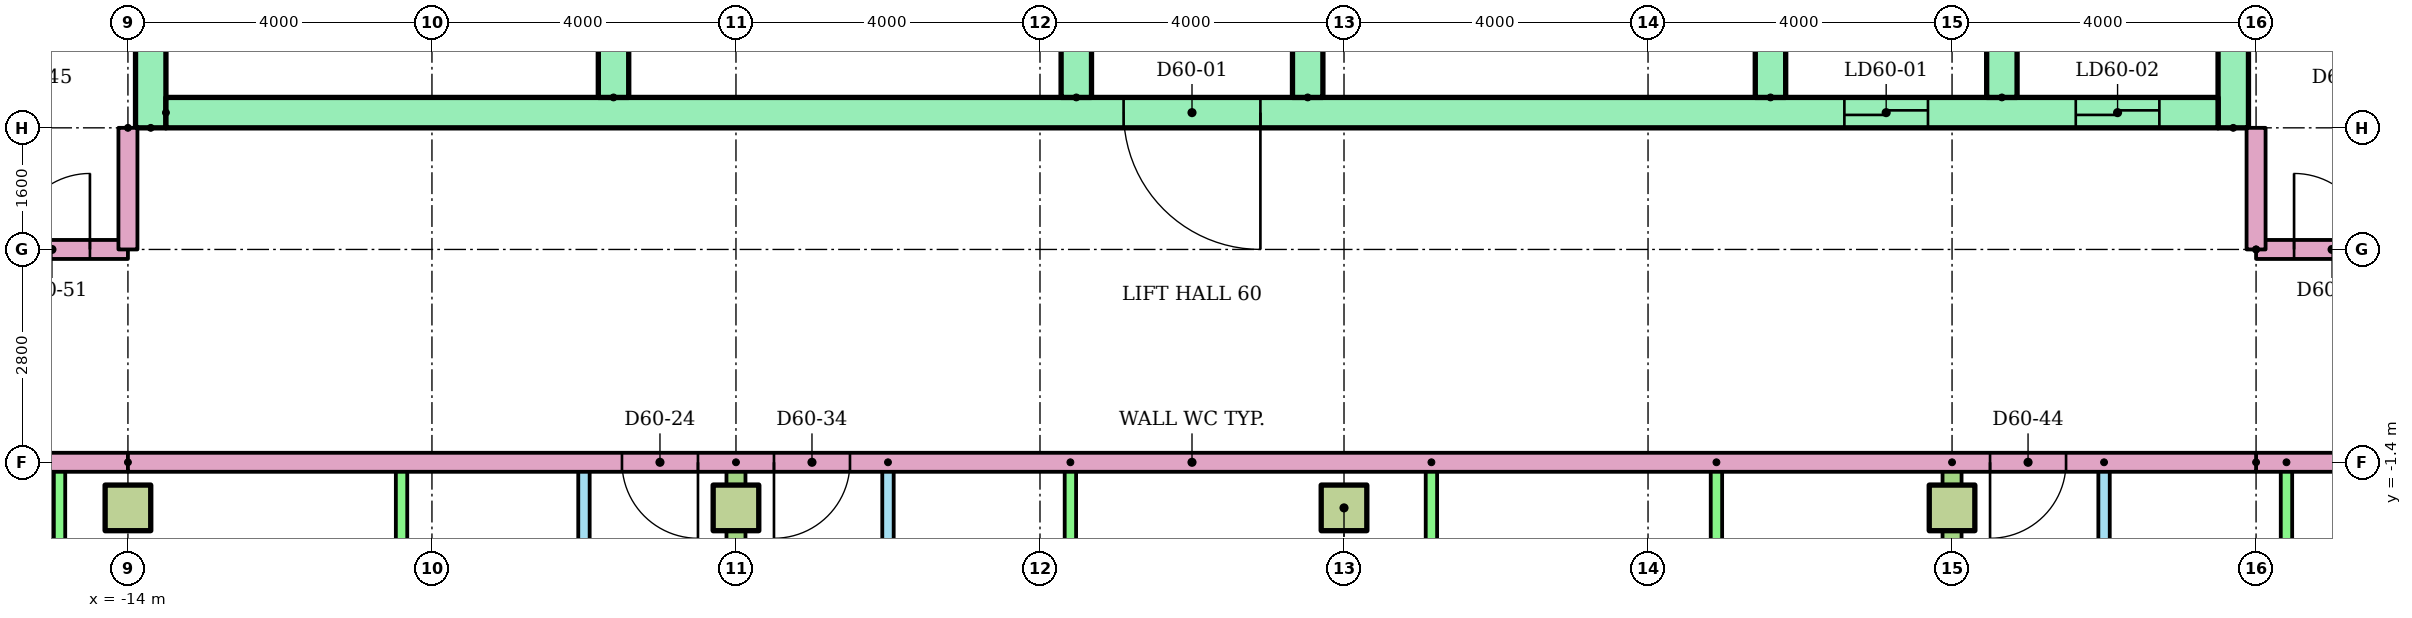
"""IFC4 building model, lengths in metres.
Left out: names, types, materials, properties, quantities, classifications, styles, units other than length and angle.
Written with IfcOpenShell. Run it as: python <this file> out.ifc"""

import sys

from ifc_helpers import new_model, si_unit, direction, frame, frame_2d, origin, origin_2d, place, context, subcontext, project, spatial, rectangle, extrude, element, fill, save


model = new_model("IFC4")
c1 = context("Model", 3, precision=1e-05, world=origin(), true_north=direction((0.0, 1.0)))
c2 = subcontext(c1, "Body", "Model", "MODEL_VIEW")
j1 = project(units=[si_unit("LENGTHUNIT", "METRE"), si_unit("PLANEANGLEUNIT", "RADIAN")], contexts=[c1])
p1 = place(None, origin())
s1 = spatial("IfcSite", under=j1, at=p1, CompositionType="ELEMENT")
p2 = place(p1, origin())
s2 = spatial("IfcBuilding", under=s1, at=p2, CompositionType="ELEMENT")
p3 = place(p2, frame((0.0, 0.0, 230.0)))
s3 = spatial("IfcBuildingStorey", under=s2, at=p3, CompositionType="ELEMENT", Elevation=230.0)
for number, where in (
    (1, (-14.0, -2.0, 0.0)),
    (2, (-6.0, -2.0, 0.0)),
    (3, (2.0, -2.0, 0.0)),
    (4, (10.0, -2.0, 0.0)),
):
    element("IfcColumn", number, at=place(p3, frame(where)), inside=s3, PredefinedType="COLUMN", context=c2, shape_type="SweptSolid", body=[
        extrude(rectangle(XDim=0.6, YDim=0.6, at=origin_2d()), origin(), (0.0, 0.0, 1.0), 3.2),
    ])
for number, where, z_axis, x_axis in (
    (5, (-13.7, 3.0, 0.0), (0.0, 0.0, 1.0), (0.0, 1.0, 0.0)),
    (6, (13.7, 3.0, 0.0), (0.0, 0.0, 1.0), (0.0, 1.0, 0.0)),
):
    element("IfcWall", number, at=place(p3, frame(where, z_axis=z_axis, x_axis=x_axis)), inside=s3, PredefinedType="SHEAR", context=c2, shape_type="SweptSolid", body=[
        extrude(rectangle(XDim=17.0, YDim=0.4, at=frame_2d((8.5, 0.0))), origin(), (0.0, 0.0, 1.0), 2.92),
    ])
p4 = place(p3, frame((-13.5, 3.2, 0.0)))
e7 = element("IfcWall", 7, at=p4, inside=s3, PredefinedType="SHEAR", context=c2, shape_type="SweptSolid", body=[
    extrude(rectangle(XDim=27.0, YDim=0.4, at=frame_2d((13.5, 0.0))), origin(), (0.0, 0.0, 1.0), 2.92),
])
p5 = place(p4, frame((22.083, 0.0, 0.0)))
e8 = element("IfcOpeningElement", 8, at=p5, cuts=e7, PredefinedType="OPENING", context=c2, shape_type="SweptSolid", body=[
    extrude(rectangle(XDim=1.1, YDim=2.1, at=frame_2d((0.55, 1.05))), frame((0.0, 0.21, 0.0), z_axis=(0.0, -1.0, 0.0), x_axis=(1.0, 0.0, 0.0)), (0.0, 0.0, 1.0), 0.42),
])
p6 = place(p4, frame((25.128, 0.0, 0.0)))
e9 = element("IfcOpeningElement", 9, at=p6, cuts=e7, PredefinedType="OPENING", context=c2, shape_type="SweptSolid", body=[
    extrude(rectangle(XDim=1.1, YDim=2.1, at=frame_2d((0.55, 1.05))), frame((0.0, 0.21, 0.0), z_axis=(0.0, -1.0, 0.0), x_axis=(1.0, 0.0, 0.0)), (0.0, 0.0, 1.0), 0.42),
])
p7 = place(p4, frame((12.6, 0.0, 0.0)))
e10 = element("IfcOpeningElement", 10, at=p7, cuts=e7, PredefinedType="OPENING", context=c2, shape_type="SweptSolid", body=[
    extrude(rectangle(XDim=1.8, YDim=2.1, at=frame_2d((0.9, 1.05))), frame((0.0, 0.21, 0.0), z_axis=(0.0, -1.0, 0.0), x_axis=(1.0, 0.0, 0.0)), (0.0, 0.0, 1.0), 0.42),
])
for number, where, z_axis, x_axis in (
    (11, (-7.611, 3.4, 0.0), (0.0, 0.0, 1.0), (0.0, 1.0, 0.0)),
    (12, (-1.522, 3.4, 0.0), (0.0, 0.0, 1.0), (0.0, 1.0, 0.0)),
    (13, (1.522, 3.4, 0.0), (0.0, 0.0, 1.0), (0.0, 1.0, 0.0)),
    (14, (7.611, 3.4, 0.0), (0.0, 0.0, 1.0), (0.0, 1.0, 0.0)),
    (15, (10.656, 3.4, 0.0), (0.0, 0.0, 1.0), (0.0, 1.0, 0.0)),
):
    element("IfcWall", number, at=place(p3, frame(where, z_axis=z_axis, x_axis=x_axis)), inside=s3, PredefinedType="SHEAR", context=c2, shape_type="SweptSolid", body=[
        extrude(rectangle(XDim=3.0, YDim=0.4, at=frame_2d((1.5, 0.0))), origin(), (0.0, 0.0, 1.0), 2.92),
    ])
p8 = place(p3, frame((-8.0, -7.0, 0.0), z_axis=(0.0, 0.0, 1.0), x_axis=(0.0, 1.0, 0.0)))
e16 = element("IfcWall", 16, at=p8, inside=s3, PredefinedType="PARTITIONING", context=c2, shape_type="SweptSolid", body=[
    extrude(rectangle(XDim=5.6, YDim=0.15, at=frame_2d((2.8, 0.0))), origin(), (0.0, 0.0, 1.0), 2.4),
])
p9 = place(p8, frame((3.65, 0.0, 0.0)))
e17 = element("IfcOpeningElement", 17, at=p9, cuts=e16, PredefinedType="OPENING", context=c2, shape_type="SweptSolid", body=[
    extrude(rectangle(XDim=0.9, YDim=2.1, at=frame_2d((0.45, 1.05))), frame((0.0, 0.085, 0.0), z_axis=(0.0, -1.0, 0.0), x_axis=(1.0, 0.0, 0.0)), (0.0, 0.0, 1.0), 0.17),
])
p10 = place(p8, frame((0.9, 0.0, 0.0)))
e18 = element("IfcOpeningElement", 18, at=p10, cuts=e16, PredefinedType="OPENING", context=c2, shape_type="SweptSolid", body=[
    extrude(rectangle(XDim=0.8, YDim=2.1, at=frame_2d((0.4, 1.05))), frame((0.0, 0.085, 0.0), z_axis=(0.0, -1.0, 0.0), x_axis=(1.0, 0.0, 0.0)), (0.0, 0.0, 1.0), 0.17),
])
for number, where, z_axis, x_axis in (
    (19, (-10.4, -7.0, 0.0), (0.0, 0.0, 1.0), (0.0, 1.0, 0.0)),
    (20, (-14.9, -7.0, 0.0), (0.0, 0.0, 1.0), (0.0, 1.0, 0.0)),
):
    element("IfcWall", number, at=place(p3, frame(where, z_axis=z_axis, x_axis=x_axis)), inside=s3, PredefinedType="PARTITIONING", context=c2, shape_type="SweptSolid", body=[
        extrude(rectangle(XDim=5.6, YDim=0.15, at=frame_2d((2.8, 0.0))), origin(), (0.0, 0.0, 1.0), 2.4),
    ])
p11 = place(p3, frame((-4.0, -1.4, 0.0), z_axis=(0.0, 0.0, 1.0), x_axis=(0.0, -1.0, 0.0)))
e21 = element("IfcWall", 21, at=p11, inside=s3, PredefinedType="PARTITIONING", context=c2, shape_type="SweptSolid", body=[
    extrude(rectangle(XDim=5.6, YDim=0.15, at=frame_2d((2.8, 0.0))), origin(), (0.0, 0.0, 1.0), 2.4),
])
p12 = place(p11, frame((1.05, 0.0, 0.0)))
e22 = element("IfcOpeningElement", 22, at=p12, cuts=e21, PredefinedType="OPENING", context=c2, shape_type="SweptSolid", body=[
    extrude(rectangle(XDim=0.9, YDim=2.1, at=frame_2d((0.45, 1.05))), frame((0.0, 0.085, 0.0), z_axis=(0.0, -1.0, 0.0), x_axis=(1.0, 0.0, 0.0)), (0.0, 0.0, 1.0), 0.17),
])
p13 = place(p11, frame((3.9, 0.0, 0.0)))
e23 = element("IfcOpeningElement", 23, at=p13, cuts=e21, PredefinedType="OPENING", context=c2, shape_type="SweptSolid", body=[
    extrude(rectangle(XDim=0.8, YDim=2.1, at=frame_2d((0.4, 1.05))), frame((0.0, 0.085, 0.0), z_axis=(0.0, -1.0, 0.0), x_axis=(1.0, 0.0, 0.0)), (0.0, 0.0, 1.0), 0.17),
])
for number, where, z_axis, x_axis in (
    (24, (-1.6, -1.4, 0.0), (0.0, 0.0, 1.0), (0.0, -1.0, 0.0)),
    (25, (3.15, -1.4, 0.0), (0.0, 0.0, 1.0), (0.0, -1.0, 0.0)),
    (26, (6.9, -1.4, 0.0), (0.0, 0.0, 1.0), (0.0, -1.0, 0.0)),
):
    element("IfcWall", number, at=place(p3, frame(where, z_axis=z_axis, x_axis=x_axis)), inside=s3, PredefinedType="PARTITIONING", context=c2, shape_type="SweptSolid", body=[
        extrude(rectangle(XDim=5.6, YDim=0.15, at=frame_2d((2.8, 0.0))), origin(), (0.0, 0.0, 1.0), 2.4),
    ])
p14 = place(p3, frame((-6.0, -1.4, 0.0), z_axis=(0.0, 0.0, 1.0), x_axis=(0.0, -1.0, 0.0)))
e27 = element("IfcWall", 27, at=p14, inside=s3, PredefinedType="PARTITIONING", context=c2, shape_type="SweptSolid", body=[
    extrude(rectangle(XDim=15.11, YDim=0.25, at=frame_2d((7.555, 0.0))), origin(), (0.0, 0.0, 1.0), 2.4),
])
p15 = place(p3, frame((12.0, -1.4, 0.0), z_axis=(0.0, 0.0, 1.0), x_axis=(0.0, -1.0, 0.0)))
e28 = element("IfcWall", 28, at=p15, inside=s3, PredefinedType="PARTITIONING", context=c2, shape_type="SweptSolid", body=[
    extrude(rectangle(XDim=5.6, YDim=0.15, at=frame_2d((2.8, 0.0))), origin(), (0.0, 0.0, 1.0), 2.4),
])
p16 = place(p15, frame((1.05, 0.0, 0.0)))
e29 = element("IfcOpeningElement", 29, at=p16, cuts=e28, PredefinedType="OPENING", context=c2, shape_type="SweptSolid", body=[
    extrude(rectangle(XDim=0.9, YDim=2.1, at=frame_2d((0.45, 1.05))), frame((0.0, 0.085, 0.0), z_axis=(0.0, -1.0, 0.0), x_axis=(1.0, 0.0, 0.0)), (0.0, 0.0, 1.0), 0.17),
])
p17 = place(p15, frame((3.9, 0.0, 0.0)))
e30 = element("IfcOpeningElement", 30, at=p17, cuts=e28, PredefinedType="OPENING", context=c2, shape_type="SweptSolid", body=[
    extrude(rectangle(XDim=0.8, YDim=2.1, at=frame_2d((0.4, 1.05))), frame((0.0, 0.085, 0.0), z_axis=(0.0, -1.0, 0.0), x_axis=(1.0, 0.0, 0.0)), (0.0, 0.0, 1.0), 0.17),
])
p18 = place(p3, frame((14.4, -1.4, 0.0), z_axis=(0.0, 0.0, 1.0), x_axis=(0.0, -1.0, 0.0)))
e31 = element("IfcWall", 31, at=p18, inside=s3, PredefinedType="PARTITIONING", context=c2, shape_type="SweptSolid", body=[
    extrude(rectangle(XDim=5.6, YDim=0.15, at=frame_2d((2.8, 0.0))), origin(), (0.0, 0.0, 1.0), 2.4),
])
p19 = place(p3, frame((10.0, -1.4, 0.0), z_axis=(0.0, 0.0, 1.0), x_axis=(0.0, -1.0, 0.0)))
e32 = element("IfcWall", 32, at=p19, inside=s3, PredefinedType="PARTITIONING", context=c2, shape_type="SweptSolid", body=[
    extrude(rectangle(XDim=15.11, YDim=0.25, at=frame_2d((7.555, 0.0))), origin(), (0.0, 0.0, 1.0), 2.4),
])
for number, where, z_axis, x_axis in (
    (33, (-14.0, -1.4, 0.0), (0.0, 0.0, 1.0), (-1.0, 0.0, 0.0)),
    (34, (28.92, -1.4, 0.0), (0.0, 0.0, 1.0), (-1.0, 0.0, 0.0)),
):
    element("IfcWall", number, at=place(p3, frame(where, z_axis=z_axis, x_axis=x_axis)), inside=s3, PredefinedType="PARTITIONING", context=c2, shape_type="SweptSolid", body=[
        extrude(rectangle(XDim=14.92, YDim=0.25, at=frame_2d((7.46, 0.0))), origin(), (0.0, 0.0, 1.0), 2.4),
    ])
p20 = place(p3, frame((-28.92, 1.4, 0.0)))
e35 = element("IfcWall", 35, at=p20, inside=s3, PredefinedType="PARTITIONING", context=c2, shape_type="SweptSolid", body=[
    extrude(rectangle(XDim=14.92, YDim=0.25, at=frame_2d((7.46, 0.0))), origin(), (0.0, 0.0, 1.0), 2.4),
])
p21 = place(p20, frame((13.42, 0.0, 0.0)))
e36 = element("IfcOpeningElement", 36, at=p21, cuts=e35, PredefinedType="OPENING", context=c2, shape_type="SweptSolid", body=[
    extrude(rectangle(XDim=1.0, YDim=2.1, at=frame_2d((0.5, 1.05))), frame((0.0, 0.135, 0.0), z_axis=(0.0, -1.0, 0.0), x_axis=(1.0, 0.0, 0.0)), (0.0, 0.0, 1.0), 0.27),
])
p22 = place(p3, frame((14.0, 1.4, 0.0)))
e37 = element("IfcWall", 37, at=p22, inside=s3, PredefinedType="PARTITIONING", context=c2, shape_type="SweptSolid", body=[
    extrude(rectangle(XDim=14.92, YDim=0.25, at=frame_2d((7.46, 0.0))), origin(), (0.0, 0.0, 1.0), 2.4),
])
p23 = place(p22, frame((0.5, 0.0, 0.0)))
e38 = element("IfcOpeningElement", 38, at=p23, cuts=e37, PredefinedType="OPENING", context=c2, shape_type="SweptSolid", body=[
    extrude(rectangle(XDim=1.0, YDim=2.1, at=frame_2d((0.5, 1.05))), frame((0.0, 0.135, 0.0), z_axis=(0.0, -1.0, 0.0), x_axis=(1.0, 0.0, 0.0)), (0.0, 0.0, 1.0), 0.27),
])
p24 = place(p3, frame((14.0, -1.4, 0.0), z_axis=(0.0, 0.0, 1.0), x_axis=(-1.0, 0.0, 0.0)))
e39 = element("IfcWall", 39, at=p24, inside=s3, PredefinedType="PARTITIONING", context=c2, shape_type="SweptSolid", body=[
    extrude(rectangle(XDim=28.0, YDim=0.25, at=frame_2d((14.0, 0.0))), origin(), (0.0, 0.0, 1.0), 2.4),
])
p25 = place(p24, frame((20.5, 0.0, 0.0)))
e40 = element("IfcOpeningElement", 40, at=p25, cuts=e39, PredefinedType="OPENING", context=c2, shape_type="SweptSolid", body=[
    extrude(rectangle(XDim=1.0, YDim=2.1, at=frame_2d((0.5, 1.05))), frame((0.0, 0.135, 0.0), z_axis=(0.0, -1.0, 0.0), x_axis=(1.0, 0.0, 0.0)), (0.0, 0.0, 1.0), 0.27),
])
p26 = place(p24, frame((18.5, 0.0, 0.0)))
e41 = element("IfcOpeningElement", 41, at=p26, cuts=e39, PredefinedType="OPENING", context=c2, shape_type="SweptSolid", body=[
    extrude(rectangle(XDim=1.0, YDim=2.1, at=frame_2d((0.5, 1.05))), frame((0.0, 0.135, 0.0), z_axis=(0.0, -1.0, 0.0), x_axis=(1.0, 0.0, 0.0)), (0.0, 0.0, 1.0), 0.27),
])
p27 = place(p24, frame((2.5, 0.0, 0.0)))
e42 = element("IfcOpeningElement", 42, at=p27, cuts=e39, PredefinedType="OPENING", context=c2, shape_type="SweptSolid", body=[
    extrude(rectangle(XDim=1.0, YDim=2.1, at=frame_2d((0.5, 1.05))), frame((0.0, 0.135, 0.0), z_axis=(0.0, -1.0, 0.0), x_axis=(1.0, 0.0, 0.0)), (0.0, 0.0, 1.0), 0.27),
])
for number, where, z_axis, x_axis in (
    (43, (-14.0, 3.0, 0.0), (0.0, 0.0, 1.0), (0.0, -1.0, 0.0)),
    (44, (14.0, 1.4, 0.0), (0.0, 0.0, 1.0), (0.0, 1.0, 0.0)),
):
    element("IfcWall", number, at=place(p3, frame(where, z_axis=z_axis, x_axis=x_axis)), inside=s3, PredefinedType="PARTITIONING", context=c2, shape_type="SweptSolid", body=[
        extrude(rectangle(XDim=1.6, YDim=0.25, at=frame_2d((0.8, 0.0))), origin(), (0.0, 0.0, 1.0), 2.4),
    ])
p28 = place(p5, origin())
e45 = element("IfcDoor", 45, at=p28, inside=s3, OperationType="SLIDING_TO_LEFT", PredefinedType="DOOR", context=c2, shape_type="SweptSolid", body=[
    extrude(rectangle(XDim=1.1, YDim=2.1, at=frame_2d((0.55, 1.05))), frame((0.0, 0.025, 0.0), z_axis=(0.0, -1.0, 0.0), x_axis=(1.0, 0.0, 0.0)), (0.0, 0.0, 1.0), 0.05),
])
fill(e8, e45)
p29 = place(p6, origin())
e46 = element("IfcDoor", 46, at=p29, inside=s3, OperationType="SLIDING_TO_LEFT", PredefinedType="DOOR", context=c2, shape_type="SweptSolid", body=[
    extrude(rectangle(XDim=1.1, YDim=2.1, at=frame_2d((0.55, 1.05))), frame((0.0, 0.025, 0.0), z_axis=(0.0, -1.0, 0.0), x_axis=(1.0, 0.0, 0.0)), (0.0, 0.0, 1.0), 0.05),
])
fill(e9, e46)
p30 = place(p7, frame((1.8, 0.0, 0.0), z_axis=(0.0, 0.0, 1.0), x_axis=(-1.0, 0.0, 0.0)))
e47 = element("IfcDoor", 47, at=p30, inside=s3, OperationType="DOUBLE_DOOR_SINGLE_SWING", PredefinedType="DOOR", context=c2, shape_type="SweptSolid", body=[
    extrude(rectangle(XDim=1.8, YDim=2.1, at=frame_2d((0.9, 1.05))), frame((0.0, 0.025, 0.0), z_axis=(0.0, -1.0, 0.0), x_axis=(1.0, 0.0, 0.0)), (0.0, 0.0, 1.0), 0.05),
])
fill(e10, e47)
p31 = place(p25, origin())
e48 = element("IfcDoor", 48, at=p31, inside=s3, OperationType="SINGLE_SWING_LEFT", PredefinedType="DOOR", context=c2, shape_type="SweptSolid", body=[
    extrude(rectangle(XDim=1.0, YDim=2.1, at=frame_2d((0.5, 1.05))), frame((0.0, 0.025, 0.0), z_axis=(0.0, -1.0, 0.0), x_axis=(1.0, 0.0, 0.0)), (0.0, 0.0, 1.0), 0.05),
])
fill(e40, e48)
p32 = place(p26, origin())
e49 = element("IfcDoor", 49, at=p32, inside=s3, OperationType="SINGLE_SWING_RIGHT", PredefinedType="DOOR", context=c2, shape_type="SweptSolid", body=[
    extrude(rectangle(XDim=1.0, YDim=2.1, at=frame_2d((0.5, 1.05))), frame((0.0, 0.025, 0.0), z_axis=(0.0, -1.0, 0.0), x_axis=(1.0, 0.0, 0.0)), (0.0, 0.0, 1.0), 0.05),
])
fill(e41, e49)
p33 = place(p27, origin())
e50 = element("IfcDoor", 50, at=p33, inside=s3, OperationType="SINGLE_SWING_RIGHT", PredefinedType="DOOR", context=c2, shape_type="SweptSolid", body=[
    extrude(rectangle(XDim=1.0, YDim=2.1, at=frame_2d((0.5, 1.05))), frame((0.0, 0.025, 0.0), z_axis=(0.0, -1.0, 0.0), x_axis=(1.0, 0.0, 0.0)), (0.0, 0.0, 1.0), 0.05),
])
fill(e42, e50)
p34 = place(p21, origin())
e51 = element("IfcDoor", 51, at=p34, inside=s3, OperationType="SINGLE_SWING_RIGHT", PredefinedType="DOOR", context=c2, shape_type="SweptSolid", body=[
    extrude(rectangle(XDim=1.0, YDim=2.1, at=frame_2d((0.5, 1.05))), frame((0.0, 0.025, 0.0), z_axis=(0.0, -1.0, 0.0), x_axis=(1.0, 0.0, 0.0)), (0.0, 0.0, 1.0), 0.05),
])
fill(e36, e51)
p35 = place(p23, origin())
e52 = element("IfcDoor", 52, at=p35, inside=s3, OperationType="SINGLE_SWING_LEFT", PredefinedType="DOOR", context=c2, shape_type="SweptSolid", body=[
    extrude(rectangle(XDim=1.0, YDim=2.1, at=frame_2d((0.5, 1.05))), frame((0.0, 0.025, 0.0), z_axis=(0.0, -1.0, 0.0), x_axis=(1.0, 0.0, 0.0)), (0.0, 0.0, 1.0), 0.05),
])
fill(e38, e52)
save(model, sys.argv[1])
